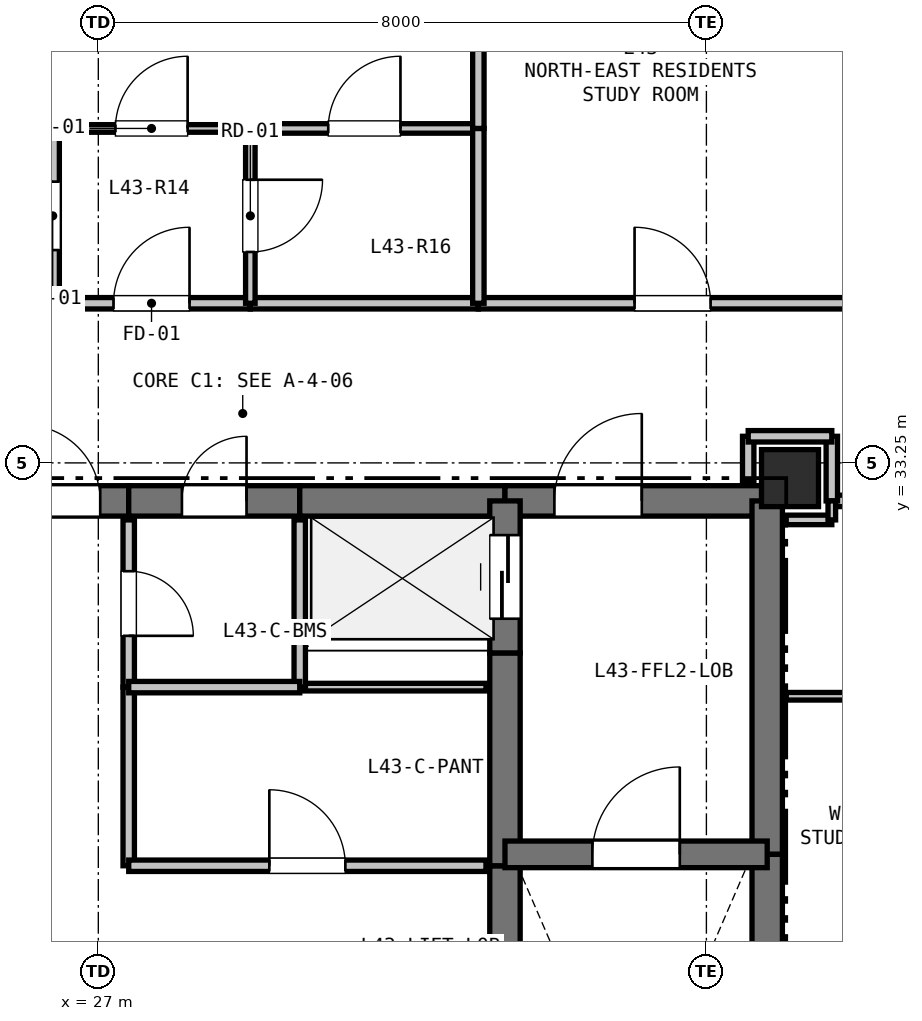
"""IFC4 building model, lengths in metres.
Left out: names, types, materials, properties, quantities, classifications, styles, units other than length and angle.
Written with IfcOpenShell. Run it as: python <this file> out.ifc"""

import sys

from ifc_helpers import new_model, si_unit, direction, frame, frame_2d, origin, origin_2d, place, context, subcontext, project, spatial, rectangle, extrude, element, fill, save


model = new_model("IFC4")
c1 = context("Model", 3, precision=1e-05, world=origin(), true_north=direction((0.0, 1.0)))
c2 = subcontext(c1, "Body", "Model", "MODEL_VIEW")
j1 = project(units=[si_unit("LENGTHUNIT", "METRE"), si_unit("PLANEANGLEUNIT", "RADIAN")], contexts=[c1])
p1 = place(None, origin())
s1 = spatial("IfcSite", under=j1, at=p1, CompositionType="ELEMENT")
p2 = place(p1, origin())
s2 = spatial("IfcBuilding", under=s1, at=p2, CompositionType="ELEMENT")
p3 = place(p2, frame((0.0, 0.0, 154.2)))
s3 = spatial("IfcBuildingStorey", under=s2, at=p3, CompositionType="ELEMENT", Elevation=154.2)
p4 = place(p3, frame((36.1, 33.05, 0.0), z_axis=(0.0, 0.0, 1.0), x_axis=(1.0, 0.0, 0.0)))
e1 = element("IfcColumn", 1, at=p4, inside=s3, PredefinedType="COLUMN", context=c2, shape_type="SweptSolid", body=[
    extrude(rectangle(XDim=0.75, YDim=0.75, at=origin_2d()), origin(), (0.0, 0.0, 1.0), 3.3),
])
p5 = place(p3, frame((17.85, 35.577, 0.0), z_axis=(0.0, 0.0, 1.0), x_axis=(0.866026619769, 0.499997893847, 0.0)))
e2 = element("IfcWall", 2, at=p5, inside=s3, PredefinedType="PARAPET", context=c2, shape_type="SweptSolid", body=[
    extrude(rectangle(XDim=10.486, YDim=0.2, at=frame_2d((5.243, 0.0))), origin(), (0.0, 0.0, 1.0), 0.2),
])
p6 = place(p3, frame((25.65, 32.75, 0.0), z_axis=(0.0, 0.0, 1.0), x_axis=(1.0, 0.0, 0.0)))
e3 = element("IfcWall", 3, at=p6, inside=s3, PredefinedType="SHEAR", context=c2, shape_type="SweptSolid", body=[
    extrude(rectangle(XDim=1.75, YDim=0.4, at=frame_2d((0.875, 0.0))), origin(), (0.0, 0.0, 1.0), 3.06),
])
p7 = place(p6, frame((0.375, 0.0, 0.0)))
e4 = element("IfcOpeningElement", 4, at=p7, cuts=e3, PredefinedType="OPENING", context=c2, shape_type="SweptSolid", body=[
    extrude(rectangle(XDim=1.0, YDim=2.15, at=frame_2d((0.5, 1.075))), frame((0.0, 0.21, 0.0), z_axis=(0.0, -1.0, 0.0), x_axis=(1.0, 0.0, 0.0)), (0.0, 0.0, 1.0), 0.42),
])
p8 = place(p3, frame((27.4, 32.75, 0.0), z_axis=(0.0, 0.0, 1.0), x_axis=(1.0, 0.0, 0.0)))
e5 = element("IfcWall", 5, at=p8, inside=s3, PredefinedType="SHEAR", context=c2, shape_type="SweptSolid", body=[
    extrude(rectangle(XDim=2.25, YDim=0.4, at=frame_2d((1.125, 0.0))), origin(), (0.0, 0.0, 1.0), 3.06),
])
p9 = place(p8, frame((0.7, 0.0, 0.0)))
e6 = element("IfcOpeningElement", 6, at=p9, cuts=e5, PredefinedType="OPENING", context=c2, shape_type="SweptSolid", body=[
    extrude(rectangle(XDim=0.85, YDim=2.1, at=frame_2d((0.425, 1.05))), frame((0.0, 0.21, 0.0), z_axis=(0.0, -1.0, 0.0), x_axis=(1.0, 0.0, 0.0)), (0.0, 0.0, 1.0), 0.42),
])
p10 = place(p3, frame((29.65, 32.75, 0.0), z_axis=(0.0, 0.0, 1.0), x_axis=(1.0, 0.0, 0.0)))
e7 = element("IfcWall", 7, at=p10, inside=s3, PredefinedType="SHEAR", context=c2, shape_type="SweptSolid", body=[
    extrude(rectangle(XDim=2.7, YDim=0.4, at=frame_2d((1.35, 0.0))), origin(), (0.0, 0.0, 1.0), 3.06),
])
p11 = place(p3, frame((32.35, 32.75, 0.0), z_axis=(0.0, 0.0, 1.0), x_axis=(1.0, 0.0, 0.0)))
e8 = element("IfcWall", 8, at=p11, inside=s3, PredefinedType="SHEAR", context=c2, shape_type="SweptSolid", body=[
    extrude(rectangle(XDim=3.45, YDim=0.4, at=frame_2d((1.725, 0.0))), origin(), (0.0, 0.0, 1.0), 3.06),
])
p12 = place(p11, frame((0.65, 0.0, 0.0)))
e9 = element("IfcOpeningElement", 9, at=p12, cuts=e8, PredefinedType="OPENING", context=c2, shape_type="SweptSolid", body=[
    extrude(rectangle(XDim=1.15, YDim=2.15, at=frame_2d((0.575, 1.075))), frame((0.0, 0.21, 0.0), z_axis=(0.0, -1.0, 0.0), x_axis=(1.0, 0.0, 0.0)), (0.0, 0.0, 1.0), 0.42),
])
p13 = place(p3, frame((35.8, 32.75, 0.0), z_axis=(0.0, 0.0, 1.0), x_axis=(0.0, -1.0, 0.0)))
e10 = element("IfcWall", 10, at=p13, inside=s3, PredefinedType="SHEAR", context=c2, shape_type="SweptSolid", body=[
    extrude(rectangle(XDim=4.65, YDim=0.4, at=frame_2d((2.325, 0.0))), origin(), (0.0, 0.0, 1.0), 3.06),
])
p14 = place(p3, frame((35.8, 28.1, 0.0), z_axis=(0.0, 0.0, 1.0), x_axis=(0.0, -1.0, 0.0)))
e11 = element("IfcWall", 11, at=p14, inside=s3, PredefinedType="SHEAR", context=c2, shape_type="SweptSolid", body=[
    extrude(rectangle(XDim=7.35, YDim=0.4, at=frame_2d((3.675, 0.0))), origin(), (0.0, 0.0, 1.0), 3.06),
])
p15 = place(p3, frame((32.35, 25.55, 0.0), z_axis=(0.0, 0.0, 1.0), x_axis=(0.0, 1.0, 0.0)))
e12 = element("IfcWall", 12, at=p15, inside=s3, PredefinedType="SHEAR", context=c2, shape_type="SweptSolid", body=[
    extrude(rectangle(XDim=2.4, YDim=0.4, at=frame_2d((1.2, 0.0))), origin(), (0.0, 0.0, 1.0), 3.06),
])
p16 = place(p3, frame((32.35, 27.95, 0.0), z_axis=(0.0, 0.0, 1.0), x_axis=(0.0, 1.0, 0.0)))
e13 = element("IfcWall", 13, at=p16, inside=s3, PredefinedType="SHEAR", context=c2, shape_type="SweptSolid", body=[
    extrude(rectangle(XDim=2.8, YDim=0.4, at=frame_2d((1.4, 0.0))), origin(), (0.0, 0.0, 1.0), 3.06),
])
p17 = place(p3, frame((32.35, 30.75, 0.0), z_axis=(0.0, 0.0, 1.0), x_axis=(0.0, 1.0, 0.0)))
e14 = element("IfcWall", 14, at=p17, inside=s3, PredefinedType="SHEAR", context=c2, shape_type="SweptSolid", body=[
    extrude(rectangle(XDim=2.0, YDim=0.4, at=frame_2d((1.0, 0.0))), origin(), (0.0, 0.0, 1.0), 3.06),
])
p18 = place(p17, frame((0.45, 0.0, 0.0)))
e15 = element("IfcOpeningElement", 15, at=p18, cuts=e14, PredefinedType="OPENING", context=c2, shape_type="SweptSolid", body=[
    extrude(rectangle(XDim=1.1, YDim=2.15, at=frame_2d((0.55, 1.075))), frame((0.0, 0.21, 0.0), z_axis=(0.0, -1.0, 0.0), x_axis=(1.0, 0.0, 0.0)), (0.0, 0.0, 1.0), 0.42),
])
p19 = place(p3, frame((32.35, 28.1, 0.0), z_axis=(0.0, 0.0, 1.0), x_axis=(1.0, 0.0, 0.0)))
e16 = element("IfcWall", 16, at=p19, inside=s3, PredefinedType="SHEAR", context=c2, shape_type="SweptSolid", body=[
    extrude(rectangle(XDim=3.45, YDim=0.35, at=frame_2d((1.725, 0.0))), origin(), (0.0, 0.0, 1.0), 3.06),
])
p20 = place(p19, frame((1.15, 0.0, 0.0)))
e17 = element("IfcOpeningElement", 17, at=p20, cuts=e16, PredefinedType="OPENING", context=c2, shape_type="SweptSolid", body=[
    extrude(rectangle(XDim=1.15, YDim=2.15, at=frame_2d((0.575, 1.075))), frame((0.0, 0.185, 0.0), z_axis=(0.0, -1.0, 0.0), x_axis=(1.0, 0.0, 0.0)), (0.0, 0.0, 1.0), 0.37),
])
p21 = place(p3, frame((32.1, 30.3, 0.0), z_axis=(0.0, 0.0, 1.0), x_axis=(-1.0, 0.0, 0.0)))
e18 = element("IfcWall", 18, at=p21, inside=s3, PredefinedType="PARTITIONING", context=c2, shape_type="SweptSolid", body=[
    extrude(rectangle(XDim=2.45, YDim=0.1, at=frame_2d((1.225, 0.0))), origin(), (0.0, 0.0, 1.0), 3.06),
])
p22 = place(p3, frame((29.65, 30.3, 0.0), z_axis=(0.0, 0.0, 1.0), x_axis=(0.0, 1.0, 0.0)))
e19 = element("IfcWall", 19, at=p22, inside=s3, PredefinedType="PARTITIONING", context=c2, shape_type="SweptSolid", body=[
    extrude(rectangle(XDim=2.2, YDim=0.15, at=frame_2d((1.1, 0.0))), origin(), (0.0, 0.0, 1.0), 3.06),
])
p23 = place(p3, frame((27.4, 32.5, 0.0), z_axis=(0.0, 0.0, 1.0), x_axis=(0.0, -1.0, 0.0)))
e20 = element("IfcWall", 20, at=p23, inside=s3, PredefinedType="PARTITIONING", context=c2, shape_type="SweptSolid", body=[
    extrude(rectangle(XDim=2.2, YDim=0.15, at=frame_2d((1.1, 0.0))), origin(), (0.0, 0.0, 1.0), 3.06),
])
p24 = place(p23, frame((0.675, 0.0, 0.0)))
e21 = element("IfcOpeningElement", 21, at=p24, cuts=e20, PredefinedType="OPENING", context=c2, shape_type="SweptSolid", body=[
    extrude(rectangle(XDim=0.85, YDim=2.1, at=frame_2d((0.425, 1.05))), frame((0.0, 0.085, 0.0), z_axis=(0.0, -1.0, 0.0), x_axis=(1.0, 0.0, 0.0)), (0.0, 0.0, 1.0), 0.17),
])
p25 = place(p3, frame((27.4, 30.3, 0.0), z_axis=(0.0, 0.0, 1.0), x_axis=(0.0, -1.0, 0.0)))
e22 = element("IfcWall", 22, at=p25, inside=s3, PredefinedType="PARTITIONING", context=c2, shape_type="SweptSolid", body=[
    extrude(rectangle(XDim=2.35, YDim=0.15, at=frame_2d((1.175, 0.0))), origin(), (0.0, 0.0, 1.0), 3.06),
])
p26 = place(p3, frame((27.4, 27.95, 0.0), z_axis=(0.0, 0.0, 1.0), x_axis=(1.0, 0.0, 0.0)))
e23 = element("IfcWall", 23, at=p26, inside=s3, PredefinedType="PARTITIONING", context=c2, shape_type="SweptSolid", body=[
    extrude(rectangle(XDim=4.7, YDim=0.15, at=frame_2d((2.35, 0.0))), origin(), (0.0, 0.0, 1.0), 3.06),
])
p27 = place(p26, frame((1.85, 0.0, 0.0)))
e24 = element("IfcOpeningElement", 24, at=p27, cuts=e23, PredefinedType="OPENING", context=c2, shape_type="SweptSolid", body=[
    extrude(rectangle(XDim=1.0, YDim=2.15, at=frame_2d((0.5, 1.075))), frame((0.0, 0.085, 0.0), z_axis=(0.0, -1.0, 0.0), x_axis=(1.0, 0.0, 0.0)), (0.0, 0.0, 1.0), 0.17),
])
p28 = place(p3, frame((35.55, 33.6, 0.0), z_axis=(0.0, 0.0, 1.0), x_axis=(0.0, -1.0, 0.0)))
e25 = element("IfcWall", 25, at=p28, inside=s3, PredefinedType="PARTITIONING", context=c2, shape_type="SweptSolid", body=[
    extrude(rectangle(XDim=0.6, YDim=0.15, at=frame_2d((0.3, 0.0))), origin(), (0.0, 0.0, 1.0), 2.585),
])
p29 = place(p3, frame((24.2, 35.35, 0.0), z_axis=(0.0, 0.0, 1.0), x_axis=(1.0, 0.0, 0.0)))
e26 = element("IfcWall", 26, at=p29, inside=s3, PredefinedType="PARTITIONING", context=c2, shape_type="SweptSolid", body=[
    extrude(rectangle(XDim=2.2, YDim=0.15, at=frame_2d((1.1, 0.0))), origin(), (0.0, 0.0, 1.0), 3.06),
])
p30 = place(p3, frame((26.4, 35.35, 0.0), z_axis=(0.0, 0.0, 1.0), x_axis=(1.0, 0.0, 0.0)))
e27 = element("IfcWall", 27, at=p30, inside=s3, PredefinedType="PARTITIONING", context=c2, shape_type="SweptSolid", body=[
    extrude(rectangle(XDim=2.6, YDim=0.15, at=frame_2d((1.3, 0.0))), origin(), (0.0, 0.0, 1.0), 3.06),
])
p31 = place(p30, frame((0.8, 0.0, 0.0)))
e28 = element("IfcOpeningElement", 28, at=p31, cuts=e27, PredefinedType="OPENING", context=c2, shape_type="SweptSolid", body=[
    extrude(rectangle(XDim=1.0, YDim=2.15, at=frame_2d((0.5, 1.075))), frame((0.0, 0.085, 0.0), z_axis=(0.0, -1.0, 0.0), x_axis=(1.0, 0.0, 0.0)), (0.0, 0.0, 1.0), 0.17),
])
p32 = place(p3, frame((29.0, 35.35, 0.0), z_axis=(0.0, 0.0, 1.0), x_axis=(1.0, 0.0, 0.0)))
e29 = element("IfcWall", 29, at=p32, inside=s3, PredefinedType="PARTITIONING", context=c2, shape_type="SweptSolid", body=[
    extrude(rectangle(XDim=3.0, YDim=0.15, at=frame_2d((1.5, 0.0))), origin(), (0.0, 0.0, 1.0), 3.06),
])
p33 = place(p3, frame((32.0, 35.35, 0.0), z_axis=(0.0, 0.0, 1.0), x_axis=(1.0, 0.0, 0.0)))
e30 = element("IfcWall", 30, at=p33, inside=s3, PredefinedType="PARTITIONING", context=c2, shape_type="SweptSolid", body=[
    extrude(rectangle(XDim=5.11, YDim=0.15, at=frame_2d((2.555, 0.0))), origin(), (0.0, 0.0, 1.0), 2.433),
])
p34 = place(p33, frame((2.055, 0.0, 0.0)))
e31 = element("IfcOpeningElement", 31, at=p34, cuts=e30, PredefinedType="OPENING", context=c2, shape_type="SweptSolid", body=[
    extrude(rectangle(XDim=1.0, YDim=2.15, at=frame_2d((0.5, 1.075))), frame((0.0, 0.085, 0.0), z_axis=(0.0, -1.0, 0.0), x_axis=(1.0, 0.0, 0.0)), (0.0, 0.0, 1.0), 0.17),
])
p35 = place(p3, frame((39.2, 32.75, 0.0), z_axis=(0.0, 0.0, 1.0), x_axis=(-1.0, 0.0, 0.0)))
e32 = element("IfcWall", 32, at=p35, inside=s3, PredefinedType="PARTITIONING", context=c2, shape_type="SweptSolid", body=[
    extrude(rectangle(XDim=2.55, YDim=0.15, at=frame_2d((1.275, 0.0))), origin(), (0.0, 0.0, 1.0), 3.06),
])
p36 = place(p35, frame((0.775, 0.0, 0.0)))
e33 = element("IfcOpeningElement", 33, at=p36, cuts=e32, PredefinedType="OPENING", context=c2, shape_type="SweptSolid", body=[
    extrude(rectangle(XDim=1.0, YDim=2.15, at=frame_2d((0.5, 1.075))), frame((0.0, 0.085, 0.0), z_axis=(0.0, -1.0, 0.0), x_axis=(1.0, 0.0, 0.0)), (0.0, 0.0, 1.0), 0.17),
])
p37 = place(p3, frame((36.65, 32.75, 0.0), z_axis=(0.0, 0.0, 1.0), x_axis=(0.0, 1.0, 0.0)))
e34 = element("IfcWall", 34, at=p37, inside=s3, PredefinedType="PARTITIONING", context=c2, shape_type="SweptSolid", body=[
    extrude(rectangle(XDim=0.85, YDim=0.15, at=frame_2d((0.425, 0.0))), origin(), (0.0, 0.0, 1.0), 2.433),
])
p38 = place(p3, frame((36.65, 33.6, 0.0), z_axis=(0.0, 0.0, 1.0), x_axis=(-1.0, 0.0, 0.0)))
e35 = element("IfcWall", 35, at=p38, inside=s3, PredefinedType="PARTITIONING", context=c2, shape_type="SweptSolid", body=[
    extrude(rectangle(XDim=1.1, YDim=0.15, at=frame_2d((0.55, 0.0))), origin(), (0.0, 0.0, 1.0), 2.433),
])
p39 = place(p3, frame((26.4, 37.65, 0.0), z_axis=(0.0, 0.0, 1.0), x_axis=(1.0, 0.0, 0.0)))
e36 = element("IfcWall", 36, at=p39, inside=s3, PredefinedType="PARTITIONING", context=c2, shape_type="SweptSolid", body=[
    extrude(rectangle(XDim=2.6, YDim=0.1, at=frame_2d((1.3, 0.0))), origin(), (0.0, 0.0, 1.0), 3.06),
])
p40 = place(p39, frame((0.825, 0.0, 0.0)))
e37 = element("IfcOpeningElement", 37, at=p40, cuts=e36, PredefinedType="OPENING", context=c2, shape_type="SweptSolid", body=[
    extrude(rectangle(XDim=0.95, YDim=2.1, at=frame_2d((0.475, 1.05))), frame((0.0, 0.06, 0.0), z_axis=(0.0, -1.0, 0.0), x_axis=(1.0, 0.0, 0.0)), (0.0, 0.0, 1.0), 0.12),
])
p41 = place(p3, frame((29.0, 37.65, 0.0), z_axis=(0.0, 0.0, 1.0), x_axis=(0.0, -1.0, 0.0)))
e38 = element("IfcWall", 38, at=p41, inside=s3, PredefinedType="PARTITIONING", context=c2, shape_type="SweptSolid", body=[
    extrude(rectangle(XDim=2.3, YDim=0.125, at=frame_2d((1.15, 0.0))), origin(), (0.0, 0.0, 1.0), 3.06),
])
p42 = place(p41, frame((0.675, 0.0, 0.0)))
e39 = element("IfcOpeningElement", 39, at=p42, cuts=e38, PredefinedType="OPENING", context=c2, shape_type="SweptSolid", body=[
    extrude(rectangle(XDim=0.95, YDim=2.1, at=frame_2d((0.475, 1.05))), frame((0.0, 0.073, 0.0), z_axis=(0.0, -1.0, 0.0), x_axis=(1.0, 0.0, 0.0)), (0.0, 0.0, 1.0), 0.145),
])
p43 = place(p3, frame((26.4, 35.35, 0.0), z_axis=(0.0, 0.0, 1.0), x_axis=(0.0, 1.0, 0.0)))
e40 = element("IfcWall", 40, at=p43, inside=s3, PredefinedType="PLUMBINGWALL", context=c2, shape_type="SweptSolid", body=[
    extrude(rectangle(XDim=2.3, YDim=0.175, at=frame_2d((1.15, 0.0))), origin(), (0.0, 0.0, 1.0), 3.06),
])
p44 = place(p43, frame((0.7, 0.0, 0.0)))
e41 = element("IfcOpeningElement", 41, at=p44, cuts=e40, PredefinedType="OPENING", context=c2, shape_type="SweptSolid", body=[
    extrude(rectangle(XDim=0.9, YDim=2.1, at=frame_2d((0.45, 1.05))), frame((0.0, 0.097, 0.0), z_axis=(0.0, -1.0, 0.0), x_axis=(1.0, 0.0, 0.0)), (0.0, 0.0, 1.0), 0.195),
])
p45 = place(p3, frame((24.2, 37.65, 0.0), z_axis=(0.0, 0.0, 1.0), x_axis=(1.0, 0.0, 0.0)))
e42 = element("IfcWall", 42, at=p45, inside=s3, PredefinedType="PLUMBINGWALL", context=c2, shape_type="SweptSolid", body=[
    extrude(rectangle(XDim=2.2, YDim=0.175, at=frame_2d((1.1, 0.0))), origin(), (0.0, 0.0, 1.0), 3.06),
])
p46 = place(p3, frame((29.0, 37.65, 0.0), z_axis=(0.0, 0.0, 1.0), x_axis=(1.0, 0.0, 0.0)))
e43 = element("IfcWall", 43, at=p46, inside=s3, PredefinedType="PARTITIONING", context=c2, shape_type="SweptSolid", body=[
    extrude(rectangle(XDim=3.0, YDim=0.125, at=frame_2d((1.5, 0.0))), origin(), (0.0, 0.0, 1.0), 3.06),
])
p47 = place(p46, frame((1.025, 0.0, 0.0)))
e44 = element("IfcOpeningElement", 44, at=p47, cuts=e43, PredefinedType="OPENING", context=c2, shape_type="SweptSolid", body=[
    extrude(rectangle(XDim=0.95, YDim=2.1, at=frame_2d((0.475, 1.05))), frame((0.0, 0.073, 0.0), z_axis=(0.0, -1.0, 0.0), x_axis=(1.0, 0.0, 0.0)), (0.0, 0.0, 1.0), 0.145),
])
p48 = place(p3, frame((32.0, 37.65, 0.0), z_axis=(0.0, 0.0, 1.0), x_axis=(0.0, -1.0, 0.0)))
e45 = element("IfcWall", 45, at=p48, inside=s3, PredefinedType="PARTITIONING", context=c2, shape_type="SweptSolid", body=[
    extrude(rectangle(XDim=2.3, YDim=0.15, at=frame_2d((1.15, 0.0))), origin(), (0.0, 0.0, 1.0), 3.06),
])
p49 = place(p3, frame((27.4, 30.3, 0.0), z_axis=(0.0, 0.0, 1.0), x_axis=(1.0, 0.0, 0.0)))
e46 = element("IfcWall", 46, at=p49, inside=s3, PredefinedType="PARTITIONING", context=c2, shape_type="SweptSolid", body=[
    extrude(rectangle(XDim=2.25, YDim=0.15, at=frame_2d((1.125, 0.0))), origin(), (0.0, 0.0, 1.0), 3.06),
])
p50 = place(p3, frame((32.0, 37.65, 0.0), z_axis=(0.0, 0.0, 1.0), x_axis=(0.0, 1.0, 0.0)))
e47 = element("IfcWall", 47, at=p50, inside=s3, PredefinedType="PARTITIONING", context=c2, shape_type="SweptSolid", body=[
    extrude(rectangle(XDim=3.69, YDim=0.15, at=frame_2d((1.845, 0.0))), origin(), (0.0, 0.0, 1.0), 3.06),
])
p51 = place(p3, frame((36.05, 30.18, 0.0), z_axis=(0.0, 0.0, 1.0), x_axis=(1.0, 0.0, 0.0)))
e48 = element("IfcWall", 48, at=p51, inside=s3, PredefinedType="PARTITIONING", context=c2, shape_type="SweptSolid", body=[
    extrude(rectangle(XDim=6.131, YDim=0.1, at=frame_2d((3.065, 0.0))), origin(), (0.0, 0.0, 1.0), 2.365),
])
p52 = place(p3, frame((36.05, 32.5, 0.0), z_axis=(0.0, 0.0, 1.0), x_axis=(1.0, 0.0, 0.0)))
e49 = element("IfcWall", 49, at=p52, inside=s3, PredefinedType="PARTITIONING", context=c2, shape_type="SweptSolid", body=[
    extrude(rectangle(XDim=0.6, YDim=0.125, at=frame_2d((0.3, 0.0))), origin(), (0.0, 0.0, 1.0), 2.585),
])
p53 = place(p3, frame((36.65, 32.5, 0.0), z_axis=(0.0, 0.0, 1.0), x_axis=(0.0, 1.0, 0.0)))
e50 = element("IfcWall", 50, at=p53, inside=s3, PredefinedType="PARTITIONING", context=c2, shape_type="SweptSolid", body=[
    extrude(rectangle(XDim=0.25, YDim=0.1, at=frame_2d((0.125, 0.0))), origin(), (0.0, 0.0, 1.0), 3.06),
])
p54 = place(p7, origin())
e51 = element("IfcDoor", 51, at=p54, inside=s3, OperationType="SINGLE_SWING_LEFT", PredefinedType="DOOR", context=c2, shape_type="SweptSolid", body=[
    extrude(rectangle(XDim=1.0, YDim=2.15, at=frame_2d((0.5, 1.075))), frame((0.0, 0.025, 0.0), z_axis=(0.0, -1.0, 0.0), x_axis=(1.0, 0.0, 0.0)), (0.0, 0.0, 1.0), 0.05),
])
fill(e4, e51)
p55 = place(p18, origin())
e52 = element("IfcDoor", 52, at=p55, inside=s3, OperationType="SLIDING_TO_LEFT", PredefinedType="DOOR", context=c2, shape_type="SweptSolid", body=[
    extrude(rectangle(XDim=1.1, YDim=2.15, at=frame_2d((0.55, 1.075))), frame((0.0, 0.025, 0.0), z_axis=(0.0, -1.0, 0.0), x_axis=(1.0, 0.0, 0.0)), (0.0, 0.0, 1.0), 0.05),
])
fill(e15, e52)
p56 = place(p20, origin())
e53 = element("IfcDoor", 53, at=p56, inside=s3, OperationType="SINGLE_SWING_RIGHT", PredefinedType="DOOR", context=c2, shape_type="SweptSolid", body=[
    extrude(rectangle(XDim=1.15, YDim=2.15, at=frame_2d((0.575, 1.075))), frame((0.0, 0.025, 0.0), z_axis=(0.0, -1.0, 0.0), x_axis=(1.0, 0.0, 0.0)), (0.0, 0.0, 1.0), 0.05),
])
fill(e17, e53)
p57 = place(p12, origin())
e54 = element("IfcDoor", 54, at=p57, inside=s3, OperationType="SINGLE_SWING_RIGHT", PredefinedType="DOOR", context=c2, shape_type="SweptSolid", body=[
    extrude(rectangle(XDim=1.15, YDim=2.15, at=frame_2d((0.575, 1.075))), frame((0.0, 0.025, 0.0), z_axis=(0.0, -1.0, 0.0), x_axis=(1.0, 0.0, 0.0)), (0.0, 0.0, 1.0), 0.05),
])
fill(e9, e54)
p58 = place(p27, origin())
e55 = element("IfcDoor", 55, at=p58, inside=s3, OperationType="SINGLE_SWING_LEFT", PredefinedType="DOOR", context=c2, shape_type="SweptSolid", body=[
    extrude(rectangle(XDim=1.0, YDim=2.15, at=frame_2d((0.5, 1.075))), frame((0.0, 0.025, 0.0), z_axis=(0.0, -1.0, 0.0), x_axis=(1.0, 0.0, 0.0)), (0.0, 0.0, 1.0), 0.05),
])
fill(e24, e55)
p59 = place(p24, origin())
e56 = element("IfcDoor", 56, at=p59, inside=s3, OperationType="SINGLE_SWING_RIGHT", PredefinedType="DOOR", context=c2, shape_type="SweptSolid", body=[
    extrude(rectangle(XDim=0.85, YDim=2.1, at=frame_2d((0.425, 1.05))), frame((0.0, 0.025, 0.0), z_axis=(0.0, -1.0, 0.0), x_axis=(1.0, 0.0, 0.0)), (0.0, 0.0, 1.0), 0.05),
])
fill(e21, e56)
p60 = place(p31, origin())
e57 = element("IfcDoor", 57, at=p60, inside=s3, OperationType="SINGLE_SWING_RIGHT", PredefinedType="DOOR", context=c2, shape_type="SweptSolid", body=[
    extrude(rectangle(XDim=1.0, YDim=2.15, at=frame_2d((0.5, 1.075))), frame((0.0, 0.025, 0.0), z_axis=(0.0, -1.0, 0.0), x_axis=(1.0, 0.0, 0.0)), (0.0, 0.0, 1.0), 0.05),
])
fill(e28, e57)
p61 = place(p9, origin())
e58 = element("IfcDoor", 58, at=p61, inside=s3, OperationType="SINGLE_SWING_RIGHT", PredefinedType="DOOR", context=c2, shape_type="SweptSolid", body=[
    extrude(rectangle(XDim=0.85, YDim=2.1, at=frame_2d((0.425, 1.05))), frame((0.0, 0.025, 0.0), z_axis=(0.0, -1.0, 0.0), x_axis=(1.0, 0.0, 0.0)), (0.0, 0.0, 1.0), 0.05),
])
fill(e6, e58)
p62 = place(p34, origin())
e59 = element("IfcDoor", 59, at=p62, inside=s3, OperationType="SINGLE_SWING_LEFT", PredefinedType="DOOR", context=c2, shape_type="SweptSolid", body=[
    extrude(rectangle(XDim=1.0, YDim=2.15, at=frame_2d((0.5, 1.075))), frame((0.0, 0.025, 0.0), z_axis=(0.0, -1.0, 0.0), x_axis=(1.0, 0.0, 0.0)), (0.0, 0.0, 1.0), 0.05),
])
fill(e31, e59)
p63 = place(p44, origin())
e60 = element("IfcDoor", 60, at=p63, inside=s3, OperationType="SINGLE_SWING_RIGHT", PredefinedType="DOOR", context=c2, shape_type="SweptSolid", body=[
    extrude(rectangle(XDim=0.9, YDim=2.1, at=frame_2d((0.45, 1.05))), frame((0.0, 0.025, 0.0), z_axis=(0.0, -1.0, 0.0), x_axis=(1.0, 0.0, 0.0)), (0.0, 0.0, 1.0), 0.05),
])
fill(e41, e60)
p64 = place(p42, origin())
e61 = element("IfcDoor", 61, at=p64, inside=s3, OperationType="SINGLE_SWING_LEFT", PredefinedType="DOOR", context=c2, shape_type="SweptSolid", body=[
    extrude(rectangle(XDim=0.95, YDim=2.1, at=frame_2d((0.475, 1.05))), frame((0.0, 0.025, 0.0), z_axis=(0.0, -1.0, 0.0), x_axis=(1.0, 0.0, 0.0)), (0.0, 0.0, 1.0), 0.05),
])
fill(e39, e61)
p65 = place(p40, origin())
e62 = element("IfcDoor", 62, at=p65, inside=s3, OperationType="SINGLE_SWING_RIGHT", PredefinedType="DOOR", context=c2, shape_type="SweptSolid", body=[
    extrude(rectangle(XDim=0.95, YDim=2.1, at=frame_2d((0.475, 1.05))), frame((0.0, 0.025, 0.0), z_axis=(0.0, -1.0, 0.0), x_axis=(1.0, 0.0, 0.0)), (0.0, 0.0, 1.0), 0.05),
])
fill(e37, e62)
p66 = place(p47, origin())
e63 = element("IfcDoor", 63, at=p66, inside=s3, OperationType="SINGLE_SWING_RIGHT", PredefinedType="DOOR", context=c2, shape_type="SweptSolid", body=[
    extrude(rectangle(XDim=0.95, YDim=2.1, at=frame_2d((0.475, 1.05))), frame((0.0, 0.025, 0.0), z_axis=(0.0, -1.0, 0.0), x_axis=(1.0, 0.0, 0.0)), (0.0, 0.0, 1.0), 0.05),
])
fill(e44, e63)
save(model, sys.argv[1])
